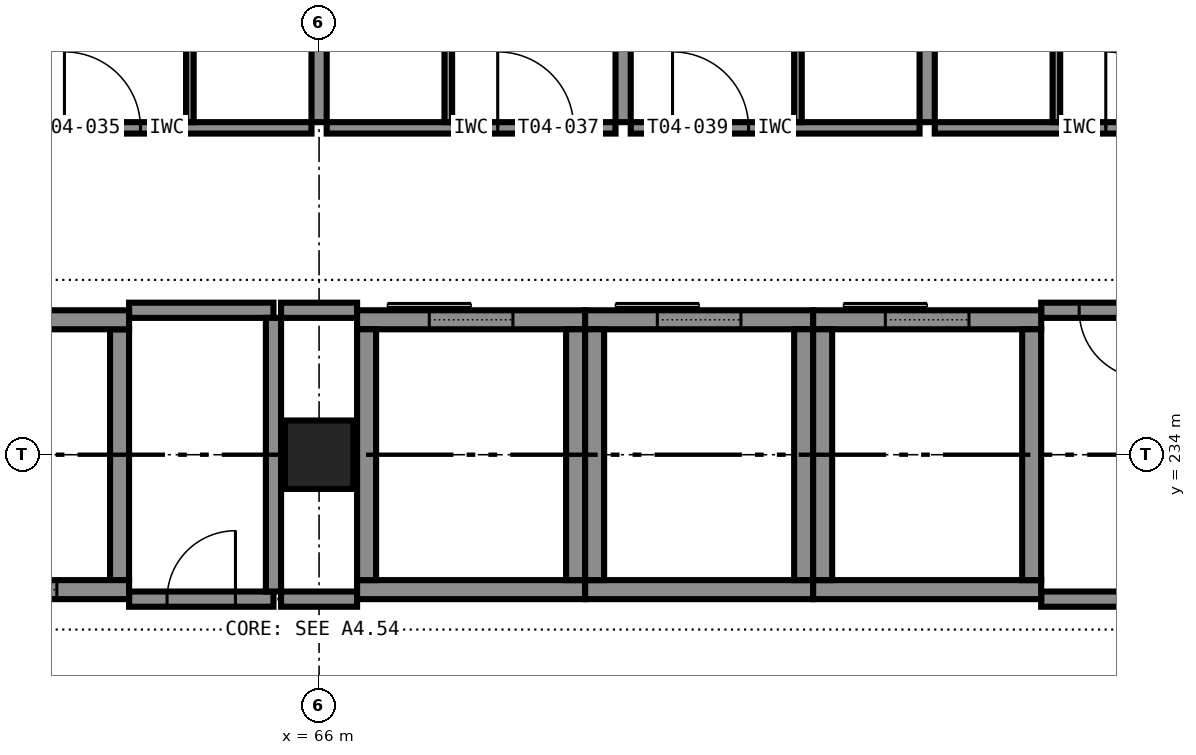
"""IFC4 building model, lengths in metres.
Left out: names, types, materials, properties, quantities, classifications, styles, units other than length and angle.
Written with IfcOpenShell. Run it as: python <this file> out.ifc"""

import sys

from ifc_helpers import new_model, si_unit, direction, frame, frame_2d, origin, origin_2d, place, context, subcontext, project, spatial, rectangle, extrude, element, fill, save


model = new_model("IFC4")
c1 = context("Model", 3, precision=1e-05, world=origin(), true_north=direction((0.0, 1.0)))
c2 = subcontext(c1, "Body", "Model", "MODEL_VIEW")
j1 = project(units=[si_unit("LENGTHUNIT", "METRE"), si_unit("PLANEANGLEUNIT", "RADIAN")], contexts=[c1])
p1 = place(None, origin())
s1 = spatial("IfcSite", under=j1, at=p1, CompositionType="ELEMENT")
p2 = place(p1, origin())
s2 = spatial("IfcBuilding", under=s1, at=p2, CompositionType="ELEMENT")
p3 = place(p2, frame((0.0, 0.0, 21.0)))
s3 = spatial("IfcBuildingStorey", under=s2, at=p3, CompositionType="ELEMENT", Elevation=21.0)
p4 = place(p3, frame((66.0, 234.0, 0.0), z_axis=(0.0, 0.0, 1.0), x_axis=(1.0, 0.0, 0.0)))
e1 = element("IfcColumn", 1, at=p4, inside=s3, PredefinedType="COLUMN", context=c2, shape_type="SweptSolid", body=[
    extrude(rectangle(XDim=0.9, YDim=0.9, at=origin_2d()), origin(), (0.0, 0.0, 1.0), 3.6),
])
p5 = place(p3, frame((60.5, 232.225, 0.0), z_axis=(0.0, 0.0, 1.0), x_axis=(1.0, 0.0, 0.0)))
e2 = element("IfcWall", 2, at=p5, inside=s3, PredefinedType="SHEAR", context=c2, shape_type="SweptSolid", body=[
    extrude(rectangle(XDim=3.0, YDim=0.25, at=frame_2d((1.5, 0.0))), origin(), (0.0, 0.0, 1.0), 3.6),
])
p6 = place(p5, frame((0.95, 0.0, 0.0)))
e3 = element("IfcOpeningElement", 3, at=p6, cuts=e2, PredefinedType="OPENING", context=c2, shape_type="SweptSolid", body=[
    extrude(rectangle(XDim=1.1, YDim=2.1, at=frame_2d((0.55, 1.05))), frame((0.0, 0.135, 0.0), z_axis=(0.0, -1.0, 0.0), x_axis=(1.0, 0.0, 0.0)), (0.0, 0.0, 1.0), 0.27),
])
p7 = place(p3, frame((60.5, 235.775, 0.0), z_axis=(0.0, 0.0, 1.0), x_axis=(1.0, 0.0, 0.0)))
e4 = element("IfcWall", 4, at=p7, inside=s3, PredefinedType="SHEAR", context=c2, shape_type="SweptSolid", body=[
    extrude(rectangle(XDim=3.0, YDim=0.25, at=frame_2d((1.5, 0.0))), origin(), (0.0, 0.0, 1.0), 3.6),
])
p8 = place(p3, frame((63.375, 232.35, 0.0), z_axis=(0.0, 0.0, 1.0), x_axis=(0.0, 1.0, 0.0)))
e5 = element("IfcWall", 5, at=p8, inside=s3, PredefinedType="SHEAR", context=c2, shape_type="SweptSolid", body=[
    extrude(rectangle(XDim=3.3, YDim=0.25, at=frame_2d((1.65, 0.0))), origin(), (0.0, 0.0, 1.0), 3.6),
])
p9 = place(p3, frame((66.5, 232.225, 0.0), z_axis=(0.0, 0.0, 1.0), x_axis=(1.0, 0.0, 0.0)))
e6 = element("IfcWall", 6, at=p9, inside=s3, PredefinedType="SHEAR", context=c2, shape_type="SweptSolid", body=[
    extrude(rectangle(XDim=3.0, YDim=0.25, at=frame_2d((1.5, 0.0))), origin(), (0.0, 0.0, 1.0), 3.6),
])
p10 = place(p3, frame((66.5, 235.775, 0.0), z_axis=(0.0, 0.0, 1.0), x_axis=(1.0, 0.0, 0.0)))
e7 = element("IfcWall", 7, at=p10, inside=s3, PredefinedType="SHEAR", context=c2, shape_type="SweptSolid", body=[
    extrude(rectangle(XDim=3.0, YDim=0.25, at=frame_2d((1.5, 0.0))), origin(), (0.0, 0.0, 1.0), 3.6),
])
p11 = place(p10, frame((0.95, 0.0, 0.0)))
e8 = element("IfcOpeningElement", 8, at=p11, cuts=e7, PredefinedType="OPENING", context=c2, shape_type="SweptSolid", body=[
    extrude(rectangle(XDim=1.1, YDim=2.1, at=frame_2d((0.55, 1.05))), frame((0.0, 0.135, 0.0), z_axis=(0.0, -1.0, 0.0), x_axis=(1.0, 0.0, 0.0)), (0.0, 0.0, 1.0), 0.27),
])
for number, where, z_axis, x_axis in (
    (9, (66.625, 232.35, 0.0), (0.0, 0.0, 1.0), (0.0, 1.0, 0.0)),
    (10, (69.375, 232.35, 0.0), (0.0, 0.0, 1.0), (0.0, 1.0, 0.0)),
):
    element("IfcWall", number, at=place(p3, frame(where, z_axis=z_axis, x_axis=x_axis)), inside=s3, PredefinedType="SHEAR", context=c2, shape_type="SweptSolid", body=[
        extrude(rectangle(XDim=3.3, YDim=0.25, at=frame_2d((1.65, 0.0))), origin(), (0.0, 0.0, 1.0), 3.6),
    ])
p12 = place(p3, frame((69.5, 232.225, 0.0), z_axis=(0.0, 0.0, 1.0), x_axis=(1.0, 0.0, 0.0)))
e11 = element("IfcWall", 11, at=p12, inside=s3, PredefinedType="SHEAR", context=c2, shape_type="SweptSolid", body=[
    extrude(rectangle(XDim=3.0, YDim=0.25, at=frame_2d((1.5, 0.0))), origin(), (0.0, 0.0, 1.0), 3.6),
])
p13 = place(p3, frame((69.5, 235.775, 0.0), z_axis=(0.0, 0.0, 1.0), x_axis=(1.0, 0.0, 0.0)))
e12 = element("IfcWall", 12, at=p13, inside=s3, PredefinedType="SHEAR", context=c2, shape_type="SweptSolid", body=[
    extrude(rectangle(XDim=3.0, YDim=0.25, at=frame_2d((1.5, 0.0))), origin(), (0.0, 0.0, 1.0), 3.6),
])
p14 = place(p13, frame((0.95, 0.0, 0.0)))
e13 = element("IfcOpeningElement", 13, at=p14, cuts=e12, PredefinedType="OPENING", context=c2, shape_type="SweptSolid", body=[
    extrude(rectangle(XDim=1.1, YDim=2.1, at=frame_2d((0.55, 1.05))), frame((0.0, 0.135, 0.0), z_axis=(0.0, -1.0, 0.0), x_axis=(1.0, 0.0, 0.0)), (0.0, 0.0, 1.0), 0.27),
])
for number, where, z_axis, x_axis in (
    (14, (69.625, 232.35, 0.0), (0.0, 0.0, 1.0), (0.0, 1.0, 0.0)),
    (15, (72.375, 232.35, 0.0), (0.0, 0.0, 1.0), (0.0, 1.0, 0.0)),
):
    element("IfcWall", number, at=place(p3, frame(where, z_axis=z_axis, x_axis=x_axis)), inside=s3, PredefinedType="SHEAR", context=c2, shape_type="SweptSolid", body=[
        extrude(rectangle(XDim=3.3, YDim=0.25, at=frame_2d((1.65, 0.0))), origin(), (0.0, 0.0, 1.0), 3.6),
    ])
p15 = place(p3, frame((72.5, 232.225, 0.0), z_axis=(0.0, 0.0, 1.0), x_axis=(1.0, 0.0, 0.0)))
e16 = element("IfcWall", 16, at=p15, inside=s3, PredefinedType="SHEAR", context=c2, shape_type="SweptSolid", body=[
    extrude(rectangle(XDim=3.0, YDim=0.25, at=frame_2d((1.5, 0.0))), origin(), (0.0, 0.0, 1.0), 3.6),
])
p16 = place(p3, frame((72.5, 235.775, 0.0), z_axis=(0.0, 0.0, 1.0), x_axis=(1.0, 0.0, 0.0)))
e17 = element("IfcWall", 17, at=p16, inside=s3, PredefinedType="SHEAR", context=c2, shape_type="SweptSolid", body=[
    extrude(rectangle(XDim=3.0, YDim=0.25, at=frame_2d((1.5, 0.0))), origin(), (0.0, 0.0, 1.0), 3.6),
])
p17 = place(p16, frame((0.95, 0.0, 0.0)))
e18 = element("IfcOpeningElement", 18, at=p17, cuts=e17, PredefinedType="OPENING", context=c2, shape_type="SweptSolid", body=[
    extrude(rectangle(XDim=1.1, YDim=2.1, at=frame_2d((0.55, 1.05))), frame((0.0, 0.135, 0.0), z_axis=(0.0, -1.0, 0.0), x_axis=(1.0, 0.0, 0.0)), (0.0, 0.0, 1.0), 0.27),
])
for number, where, z_axis, x_axis in (
    (19, (72.625, 232.35, 0.0), (0.0, 0.0, 1.0), (0.0, 1.0, 0.0)),
    (20, (75.375, 232.35, 0.0), (0.0, 0.0, 1.0), (0.0, 1.0, 0.0)),
):
    element("IfcWall", number, at=place(p3, frame(where, z_axis=z_axis, x_axis=x_axis)), inside=s3, PredefinedType="SHEAR", context=c2, shape_type="SweptSolid", body=[
        extrude(rectangle(XDim=3.3, YDim=0.25, at=frame_2d((1.65, 0.0))), origin(), (0.0, 0.0, 1.0), 3.6),
    ])
p18 = place(p3, frame((63.5, 232.1, 0.0), z_axis=(0.0, 0.0, 1.0), x_axis=(1.0, 0.0, 0.0)))
e21 = element("IfcWall", 21, at=p18, inside=s3, PredefinedType="PARTITIONING", context=c2, shape_type="SweptSolid", body=[
    extrude(rectangle(XDim=1.9, YDim=0.2, at=frame_2d((0.95, 0.0))), origin(), (0.0, 0.0, 1.0), 3.4),
])
p19 = place(p18, frame((0.5, 0.0, 0.0)))
e22 = element("IfcOpeningElement", 22, at=p19, cuts=e21, PredefinedType="OPENING", context=c2, shape_type="SweptSolid", body=[
    extrude(rectangle(XDim=0.9, YDim=2.1, at=frame_2d((0.45, 1.05))), frame((0.0, 0.11, 0.0), z_axis=(0.0, -1.0, 0.0), x_axis=(1.0, 0.0, 0.0)), (0.0, 0.0, 1.0), 0.22),
])
p20 = place(p3, frame((65.5, 232.1, 0.0), z_axis=(0.0, 0.0, 1.0), x_axis=(1.0, 0.0, 0.0)))
e23 = element("IfcWall", 23, at=p20, inside=s3, PredefinedType="PARTITIONING", context=c2, shape_type="SweptSolid", body=[
    extrude(rectangle(XDim=1.0, YDim=0.2, at=frame_2d((0.5, 0.0))), origin(), (0.0, 0.0, 1.0), 3.4),
])
for number, where, z_axis, x_axis in (
    (24, (75.5, 232.1, 0.0), (0.0, 0.0, 1.0), (1.0, 0.0, 0.0)),
    (25, (63.5, 235.9, 0.0), (0.0, 0.0, 1.0), (1.0, 0.0, 0.0)),
):
    element("IfcWall", number, at=place(p3, frame(where, z_axis=z_axis, x_axis=x_axis)), inside=s3, PredefinedType="PARTITIONING", context=c2, shape_type="SweptSolid", body=[
        extrude(rectangle(XDim=1.9, YDim=0.2, at=frame_2d((0.95, 0.0))), origin(), (0.0, 0.0, 1.0), 3.4),
    ])
p21 = place(p3, frame((65.5, 235.9, 0.0), z_axis=(0.0, 0.0, 1.0), x_axis=(1.0, 0.0, 0.0)))
e26 = element("IfcWall", 26, at=p21, inside=s3, PredefinedType="PARTITIONING", context=c2, shape_type="SweptSolid", body=[
    extrude(rectangle(XDim=1.0, YDim=0.2, at=frame_2d((0.5, 0.0))), origin(), (0.0, 0.0, 1.0), 3.4),
])
p22 = place(p3, frame((77.4, 235.9, 0.0), z_axis=(0.0, 0.0, 1.0), x_axis=(-1.0, 0.0, 0.0)))
e27 = element("IfcWall", 27, at=p22, inside=s3, PredefinedType="PARTITIONING", context=c2, shape_type="SweptSolid", body=[
    extrude(rectangle(XDim=1.9, YDim=0.2, at=frame_2d((0.95, 0.0))), origin(), (0.0, 0.0, 1.0), 3.4),
])
p23 = place(p22, frame((0.5, 0.0, 0.0)))
e28 = element("IfcOpeningElement", 28, at=p23, cuts=e27, PredefinedType="OPENING", context=c2, shape_type="SweptSolid", body=[
    extrude(rectangle(XDim=0.9, YDim=2.1, at=frame_2d((0.45, 1.05))), frame((0.0, 0.11, 0.0), z_axis=(0.0, -1.0, 0.0), x_axis=(1.0, 0.0, 0.0)), (0.0, 0.0, 1.0), 0.22),
])
p24 = place(p3, frame((65.4, 232.2, 0.0), z_axis=(0.0, 0.0, 1.0), x_axis=(0.0, 1.0, 0.0)))
e29 = element("IfcWall", 29, at=p24, inside=s3, PredefinedType="PARTITIONING", context=c2, shape_type="SweptSolid", body=[
    extrude(rectangle(XDim=3.6, YDim=0.2, at=frame_2d((1.8, 0.0))), origin(), (0.0, 0.0, 1.0), 3.4),
])
p25 = place(p3, frame((62.1, 238.3, 0.0), z_axis=(0.0, 0.0, 1.0), x_axis=(1.0, 0.0, 0.0)))
e30 = element("IfcWall", 30, at=p25, inside=s3, PredefinedType="PARTITIONING", context=c2, shape_type="SweptSolid", body=[
    extrude(rectangle(XDim=3.8, YDim=0.15, at=frame_2d((1.9, 0.0))), origin(), (0.0, 0.0, 1.0), 3.4),
])
p26 = place(p25, frame((0.55, 0.0, 0.0)))
e31 = element("IfcOpeningElement", 31, at=p26, cuts=e30, PredefinedType="OPENING", context=c2, shape_type="SweptSolid", body=[
    extrude(rectangle(XDim=1.0, YDim=2.1, at=frame_2d((0.5, 1.05))), frame((0.0, 0.085, 0.0), z_axis=(0.0, -1.0, 0.0), x_axis=(1.0, 0.0, 0.0)), (0.0, 0.0, 1.0), 0.17),
])
p27 = place(p3, frame((64.3, 238.375, 0.0), z_axis=(0.0, 0.0, 1.0), x_axis=(0.0, 1.0, 0.0)))
e32 = element("IfcWall", 32, at=p27, inside=s3, PredefinedType="PARTITIONING", context=c2, shape_type="SweptSolid", body=[
    extrude(rectangle(XDim=2.875, YDim=0.1, at=frame_2d((1.438, 0.0))), origin(), (0.0, 0.0, 1.0), 3.4),
])
p28 = place(p27, frame((1.038, 0.0, 0.0)))
e33 = element("IfcOpeningElement", 33, at=p28, cuts=e32, PredefinedType="OPENING", context=c2, shape_type="SweptSolid", body=[
    extrude(rectangle(XDim=0.8, YDim=2.1, at=frame_2d((0.4, 1.05))), frame((0.0, 0.06, 0.0), z_axis=(0.0, -1.0, 0.0), x_axis=(1.0, 0.0, 0.0)), (0.0, 0.0, 1.0), 0.12),
])
p29 = place(p3, frame((66.1, 238.3, 0.0), z_axis=(0.0, 0.0, 1.0), x_axis=(1.0, 0.0, 0.0)))
e34 = element("IfcWall", 34, at=p29, inside=s3, PredefinedType="PARTITIONING", context=c2, shape_type="SweptSolid", body=[
    extrude(rectangle(XDim=3.8, YDim=0.15, at=frame_2d((1.9, 0.0))), origin(), (0.0, 0.0, 1.0), 3.4),
])
p30 = place(p29, frame((2.25, 0.0, 0.0)))
e35 = element("IfcOpeningElement", 35, at=p30, cuts=e34, PredefinedType="OPENING", context=c2, shape_type="SweptSolid", body=[
    extrude(rectangle(XDim=1.0, YDim=2.1, at=frame_2d((0.5, 1.05))), frame((0.0, 0.085, 0.0), z_axis=(0.0, -1.0, 0.0), x_axis=(1.0, 0.0, 0.0)), (0.0, 0.0, 1.0), 0.17),
])
p31 = place(p3, frame((67.7, 241.25, 0.0), z_axis=(0.0, 0.0, 1.0), x_axis=(0.0, -1.0, 0.0)))
e36 = element("IfcWall", 36, at=p31, inside=s3, PredefinedType="PARTITIONING", context=c2, shape_type="SweptSolid", body=[
    extrude(rectangle(XDim=2.875, YDim=0.1, at=frame_2d((1.438, 0.0))), origin(), (0.0, 0.0, 1.0), 3.4),
])
p32 = place(p31, frame((1.038, 0.0, 0.0)))
e37 = element("IfcOpeningElement", 37, at=p32, cuts=e36, PredefinedType="OPENING", context=c2, shape_type="SweptSolid", body=[
    extrude(rectangle(XDim=0.8, YDim=2.1, at=frame_2d((0.4, 1.05))), frame((0.0, 0.06, 0.0), z_axis=(0.0, -1.0, 0.0), x_axis=(1.0, 0.0, 0.0)), (0.0, 0.0, 1.0), 0.12),
])
p33 = place(p3, frame((70.1, 238.3, 0.0), z_axis=(0.0, 0.0, 1.0), x_axis=(1.0, 0.0, 0.0)))
e38 = element("IfcWall", 38, at=p33, inside=s3, PredefinedType="PARTITIONING", context=c2, shape_type="SweptSolid", body=[
    extrude(rectangle(XDim=3.8, YDim=0.15, at=frame_2d((1.9, 0.0))), origin(), (0.0, 0.0, 1.0), 3.4),
])
p34 = place(p33, frame((0.55, 0.0, 0.0)))
e39 = element("IfcOpeningElement", 39, at=p34, cuts=e38, PredefinedType="OPENING", context=c2, shape_type="SweptSolid", body=[
    extrude(rectangle(XDim=1.0, YDim=2.1, at=frame_2d((0.5, 1.05))), frame((0.0, 0.085, 0.0), z_axis=(0.0, -1.0, 0.0), x_axis=(1.0, 0.0, 0.0)), (0.0, 0.0, 1.0), 0.17),
])
p35 = place(p3, frame((72.3, 238.375, 0.0), z_axis=(0.0, 0.0, 1.0), x_axis=(0.0, 1.0, 0.0)))
e40 = element("IfcWall", 40, at=p35, inside=s3, PredefinedType="PARTITIONING", context=c2, shape_type="SweptSolid", body=[
    extrude(rectangle(XDim=2.875, YDim=0.1, at=frame_2d((1.438, 0.0))), origin(), (0.0, 0.0, 1.0), 3.4),
])
p36 = place(p35, frame((1.038, 0.0, 0.0)))
e41 = element("IfcOpeningElement", 41, at=p36, cuts=e40, PredefinedType="OPENING", context=c2, shape_type="SweptSolid", body=[
    extrude(rectangle(XDim=0.8, YDim=2.1, at=frame_2d((0.4, 1.05))), frame((0.0, 0.06, 0.0), z_axis=(0.0, -1.0, 0.0), x_axis=(1.0, 0.0, 0.0)), (0.0, 0.0, 1.0), 0.12),
])
p37 = place(p3, frame((74.1, 238.3, 0.0), z_axis=(0.0, 0.0, 1.0), x_axis=(1.0, 0.0, 0.0)))
e42 = element("IfcWall", 42, at=p37, inside=s3, PredefinedType="PARTITIONING", context=c2, shape_type="SweptSolid", body=[
    extrude(rectangle(XDim=3.8, YDim=0.15, at=frame_2d((1.9, 0.0))), origin(), (0.0, 0.0, 1.0), 3.4),
])
p38 = place(p37, frame((2.25, 0.0, 0.0)))
e43 = element("IfcOpeningElement", 43, at=p38, cuts=e42, PredefinedType="OPENING", context=c2, shape_type="SweptSolid", body=[
    extrude(rectangle(XDim=1.0, YDim=2.1, at=frame_2d((0.5, 1.05))), frame((0.0, 0.085, 0.0), z_axis=(0.0, -1.0, 0.0), x_axis=(1.0, 0.0, 0.0)), (0.0, 0.0, 1.0), 0.17),
])
p39 = place(p3, frame((75.7, 241.25, 0.0), z_axis=(0.0, 0.0, 1.0), x_axis=(0.0, -1.0, 0.0)))
e44 = element("IfcWall", 44, at=p39, inside=s3, PredefinedType="PARTITIONING", context=c2, shape_type="SweptSolid", body=[
    extrude(rectangle(XDim=2.875, YDim=0.1, at=frame_2d((1.438, 0.0))), origin(), (0.0, 0.0, 1.0), 3.4),
])
p40 = place(p39, frame((1.038, 0.0, 0.0)))
e45 = element("IfcOpeningElement", 45, at=p40, cuts=e44, PredefinedType="OPENING", context=c2, shape_type="SweptSolid", body=[
    extrude(rectangle(XDim=0.8, YDim=2.1, at=frame_2d((0.4, 1.05))), frame((0.0, 0.06, 0.0), z_axis=(0.0, -1.0, 0.0), x_axis=(1.0, 0.0, 0.0)), (0.0, 0.0, 1.0), 0.12),
])
p41 = place(p3, frame((66.0, 245.55, 0.0), z_axis=(0.0, 0.0, 1.0), x_axis=(0.0, -1.0, 0.0)))
e46 = element("IfcWall", 46, at=p41, inside=s3, PredefinedType="PARTITIONING", context=c2, shape_type="SweptSolid", body=[
    extrude(rectangle(XDim=7.175, YDim=0.2, at=frame_2d((3.587, 0.0))), origin(), (0.0, 0.0, 1.0), 2.6),
])
for number, where, z_axis, x_axis in (
    (47, (70.0, 245.7, 0.0), (0.0, 0.0, 1.0), (0.0, -1.0, 0.0)),
    (48, (74.0, 245.7, 0.0), (0.0, 0.0, 1.0), (0.0, -1.0, 0.0)),
):
    element("IfcWall", number, at=place(p3, frame(where, z_axis=z_axis, x_axis=x_axis)), inside=s3, PredefinedType="PARTITIONING", context=c2, shape_type="SweptSolid", body=[
        extrude(rectangle(XDim=7.325, YDim=0.2, at=frame_2d((3.663, 0.0))), origin(), (0.0, 0.0, 1.0), 3.4),
    ])
p42 = place(p19, origin())
e49 = element("IfcDoor", 49, at=p42, inside=s3, OperationType="SINGLE_SWING_RIGHT", PredefinedType="DOOR", context=c2, shape_type="SweptSolid", body=[
    extrude(rectangle(XDim=0.9, YDim=2.1, at=frame_2d((0.45, 1.05))), frame((0.0, 0.025, 0.0), z_axis=(0.0, -1.0, 0.0), x_axis=(1.0, 0.0, 0.0)), (0.0, 0.0, 1.0), 0.05),
])
fill(e22, e49)
p43 = place(p23, origin())
e50 = element("IfcDoor", 50, at=p43, inside=s3, OperationType="SINGLE_SWING_LEFT", PredefinedType="DOOR", context=c2, shape_type="SweptSolid", body=[
    extrude(rectangle(XDim=0.9, YDim=2.1, at=frame_2d((0.45, 1.05))), frame((0.0, 0.025, 0.0), z_axis=(0.0, -1.0, 0.0), x_axis=(1.0, 0.0, 0.0)), (0.0, 0.0, 1.0), 0.05),
])
fill(e28, e50)
p44 = place(p26, origin())
e51 = element("IfcDoor", 51, at=p44, inside=s3, OperationType="SINGLE_SWING_LEFT", PredefinedType="DOOR", context=c2, shape_type="SweptSolid", body=[
    extrude(rectangle(XDim=1.0, YDim=2.1, at=frame_2d((0.5, 1.05))), frame((0.0, 0.025, 0.0), z_axis=(0.0, -1.0, 0.0), x_axis=(1.0, 0.0, 0.0)), (0.0, 0.0, 1.0), 0.05),
])
fill(e31, e51)
p45 = place(p30, origin())
e52 = element("IfcDoor", 52, at=p45, inside=s3, OperationType="SINGLE_SWING_LEFT", PredefinedType="DOOR", context=c2, shape_type="SweptSolid", body=[
    extrude(rectangle(XDim=1.0, YDim=2.1, at=frame_2d((0.5, 1.05))), frame((0.0, 0.025, 0.0), z_axis=(0.0, -1.0, 0.0), x_axis=(1.0, 0.0, 0.0)), (0.0, 0.0, 1.0), 0.05),
])
fill(e35, e52)
p46 = place(p34, origin())
e53 = element("IfcDoor", 53, at=p46, inside=s3, OperationType="SINGLE_SWING_LEFT", PredefinedType="DOOR", context=c2, shape_type="SweptSolid", body=[
    extrude(rectangle(XDim=1.0, YDim=2.1, at=frame_2d((0.5, 1.05))), frame((0.0, 0.025, 0.0), z_axis=(0.0, -1.0, 0.0), x_axis=(1.0, 0.0, 0.0)), (0.0, 0.0, 1.0), 0.05),
])
fill(e39, e53)
p47 = place(p38, origin())
e54 = element("IfcDoor", 54, at=p47, inside=s3, OperationType="SINGLE_SWING_LEFT", PredefinedType="DOOR", context=c2, shape_type="SweptSolid", body=[
    extrude(rectangle(XDim=1.0, YDim=2.1, at=frame_2d((0.5, 1.05))), frame((0.0, 0.025, 0.0), z_axis=(0.0, -1.0, 0.0), x_axis=(1.0, 0.0, 0.0)), (0.0, 0.0, 1.0), 0.05),
])
fill(e43, e54)
p48 = place(p6, origin())
e55 = element("IfcDoor", 55, at=p48, inside=s3, OperationType="SLIDING_TO_LEFT", PredefinedType="DOOR", context=c2, shape_type="SweptSolid", body=[
    extrude(rectangle(XDim=1.1, YDim=2.1, at=frame_2d((0.55, 1.05))), frame((0.0, 0.025, 0.0), z_axis=(0.0, -1.0, 0.0), x_axis=(1.0, 0.0, 0.0)), (0.0, 0.0, 1.0), 0.05),
])
fill(e3, e55)
p49 = place(p11, origin())
e56 = element("IfcDoor", 56, at=p49, inside=s3, OperationType="SLIDING_TO_LEFT", PredefinedType="DOOR", context=c2, shape_type="SweptSolid", body=[
    extrude(rectangle(XDim=1.1, YDim=2.1, at=frame_2d((0.55, 1.05))), frame((0.0, 0.025, 0.0), z_axis=(0.0, -1.0, 0.0), x_axis=(1.0, 0.0, 0.0)), (0.0, 0.0, 1.0), 0.05),
])
fill(e8, e56)
p50 = place(p14, origin())
e57 = element("IfcDoor", 57, at=p50, inside=s3, OperationType="SLIDING_TO_LEFT", PredefinedType="DOOR", context=c2, shape_type="SweptSolid", body=[
    extrude(rectangle(XDim=1.1, YDim=2.1, at=frame_2d((0.55, 1.05))), frame((0.0, 0.025, 0.0), z_axis=(0.0, -1.0, 0.0), x_axis=(1.0, 0.0, 0.0)), (0.0, 0.0, 1.0), 0.05),
])
fill(e13, e57)
p51 = place(p17, origin())
e58 = element("IfcDoor", 58, at=p51, inside=s3, OperationType="SLIDING_TO_LEFT", PredefinedType="DOOR", context=c2, shape_type="SweptSolid", body=[
    extrude(rectangle(XDim=1.1, YDim=2.1, at=frame_2d((0.55, 1.05))), frame((0.0, 0.025, 0.0), z_axis=(0.0, -1.0, 0.0), x_axis=(1.0, 0.0, 0.0)), (0.0, 0.0, 1.0), 0.05),
])
fill(e18, e58)
save(model, sys.argv[1])
